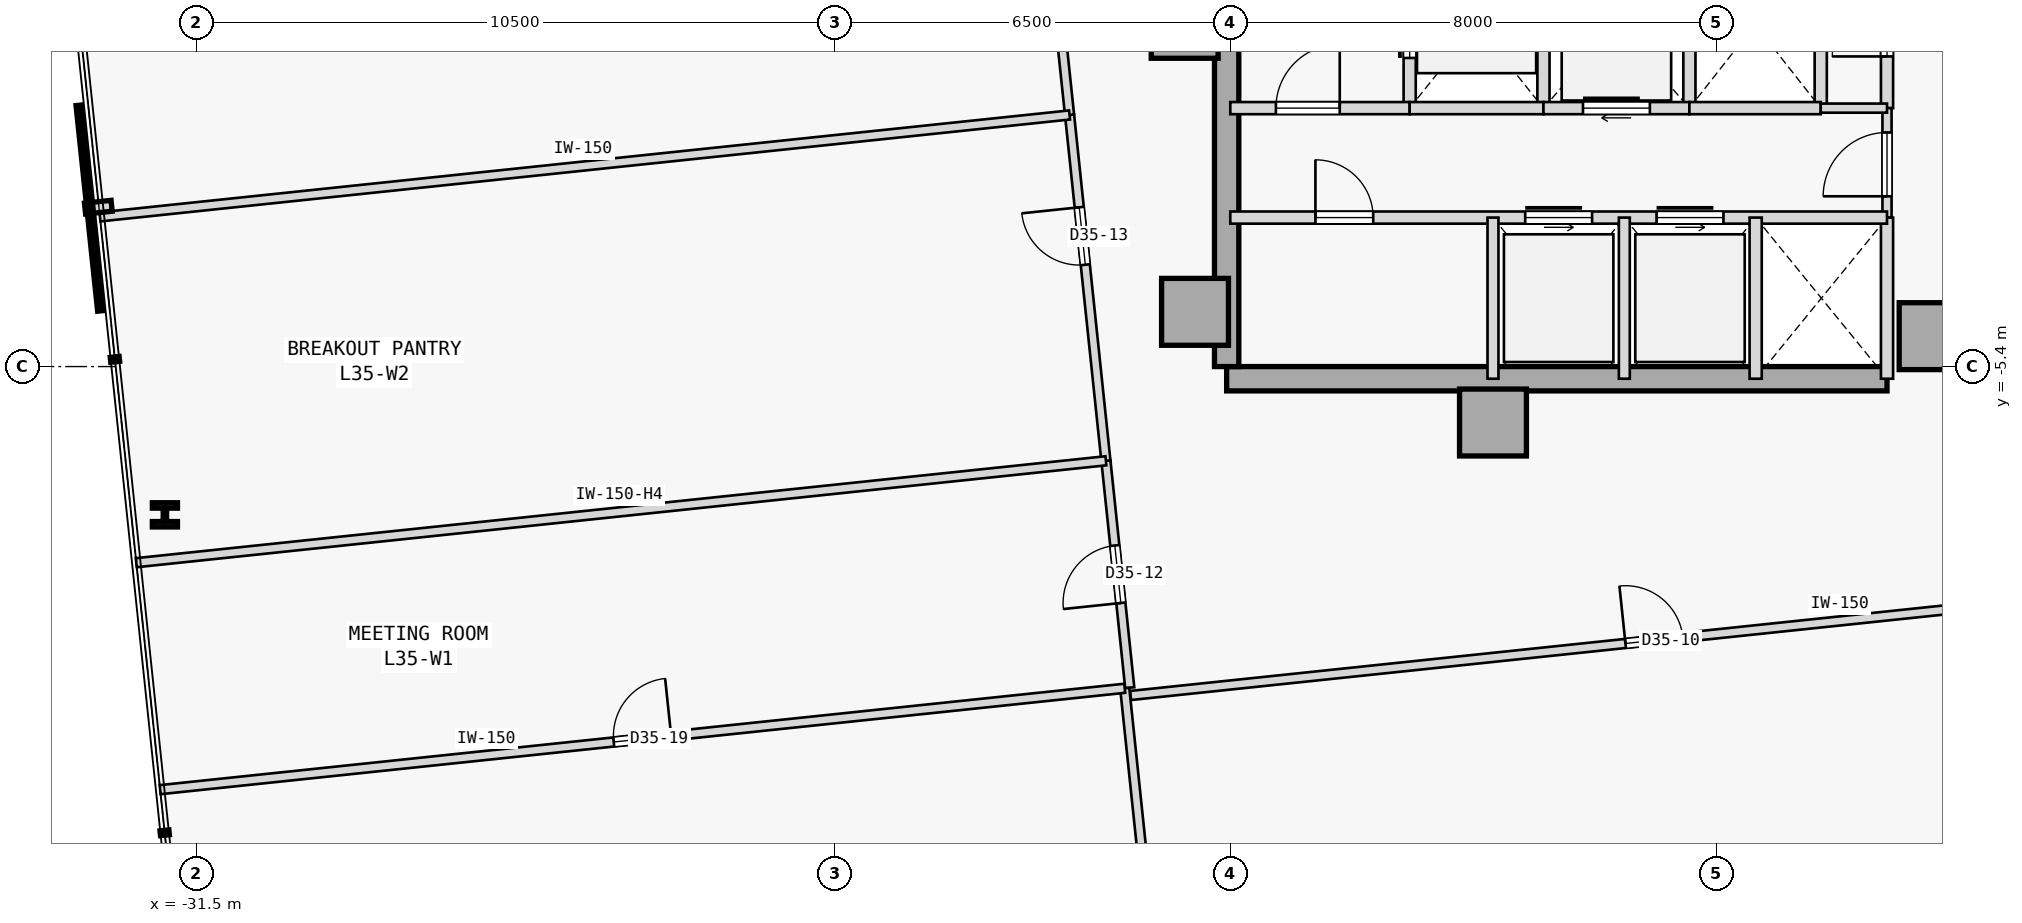
"""IFC4 building model, lengths in metres.
Left out: names, types, materials, properties, quantities, classifications, styles, units other than length and angle.
Written with IfcOpenShell. Run it as: python <this file> out.ifc"""

import sys

from ifc_helpers import new_model, si_unit, direction, frame, frame_2d, origin, origin_2d, place, context, subcontext, project, spatial, rectangle, i_section, extrude, element, fill, save


model = new_model("IFC4")
c1 = context("Model", 3, precision=1e-05, world=origin(), true_north=direction((0.0, 1.0)))
c2 = subcontext(c1, "Body", "Model", "MODEL_VIEW")
j1 = project(units=[si_unit("LENGTHUNIT", "METRE"), si_unit("PLANEANGLEUNIT", "RADIAN")], contexts=[c1])
p1 = place(None, origin())
s1 = spatial("IfcSite", under=j1, at=p1, CompositionType="ELEMENT")
p2 = place(p1, origin())
s2 = spatial("IfcBuilding", under=s1, at=p2, CompositionType="ELEMENT")
p3 = place(p2, frame((0.0, 0.0, 139.2)))
s3 = spatial("IfcBuildingStorey", under=s2, at=p3, CompositionType="ELEMENT", Elevation=139.2)
for number, where, z_axis, x_axis in (
    (1, (-15.25, 0.22, 0.0), (0.0, 0.0, 1.0), (1.0, 0.0, 0.0)),
    (2, (-15.08, -4.5, 0.0), (0.0, 0.0, 1.0), (1.0, 0.0, 0.0)),
    (3, (-10.18, -6.32, 0.0), (0.0, 0.0, 1.0), (1.0, 0.0, 0.0)),
    (4, (-2.95, -4.9, 0.0), (0.0, 0.0, 1.0), (1.0, 0.0, 0.0)),
):
    element("IfcColumn", number, at=place(p3, frame(where, z_axis=z_axis, x_axis=x_axis)), inside=s3, PredefinedType="COLUMN", context=c2, shape_type="SweptSolid", body=[
        extrude(rectangle(XDim=1.1, YDim=1.1, at=origin_2d()), origin(), (0.0, 0.0, 1.0), 3.7),
    ])
p4 = place(p3, frame((-14.56, -5.6, 0.0), z_axis=(0.0, 0.0, 1.0), x_axis=(1.0, 0.0, 0.0)))
e5 = element("IfcWall", 5, at=p4, inside=s3, PredefinedType="SHEAR", context=c2, shape_type="SweptSolid", body=[
    extrude(rectangle(XDim=10.86, YDim=0.4, at=frame_2d((5.43, 0.0))), origin(), (0.0, 0.0, 1.0), 3.3),
])
p5 = place(p3, frame((-14.56, -5.4, 0.0), z_axis=(0.0, 0.0, 1.0), x_axis=(0.0, 1.0, 0.0)))
e6 = element("IfcWall", 6, at=p5, inside=s3, PredefinedType="SHEAR", context=c2, shape_type="SweptSolid", body=[
    extrude(rectangle(XDim=10.8, YDim=0.4, at=frame_2d((5.4, 0.0))), origin(), (0.0, 0.0, 1.0), 3.3),
])
p6 = place(p3, frame((-32.021, -7.838, 0.0), z_axis=(0.0, 0.0, 1.0), x_axis=(1.0, 0.0, 0.0)))
e7 = element("IfcColumn", 7, at=p6, inside=s3, PredefinedType="COLUMN", context=c2, shape_type="SweptSolid", body=[
    extrude(i_section(OverallWidth=0.413, OverallDepth=0.398, WebThickness=0.056, FlangeThickness=0.089, FilletRadius=0.015, at=origin_2d()), origin(), (0.0, 0.0, 1.0), 3.7),
])
p7 = place(p3, frame((-3.7, -1.15, 0.0), z_axis=(0.0, 0.0, 1.0), x_axis=(0.0, 1.0, 0.0)))
e8 = element("IfcWall", 8, at=p7, inside=s3, PredefinedType="STANDARD", context=c2, shape_type="SweptSolid", body=[
    extrude(rectangle(XDim=6.75, YDim=0.2, at=frame_2d((3.375, 0.0))), origin(), (0.0, 0.0, 1.0), 3.3),
])
p8 = place(p7, frame((3.6, 0.0, 0.0)))
e9 = element("IfcOpeningElement", 9, at=p8, cuts=e8, PredefinedType="OPENING", context=c2, shape_type="SweptSolid", body=[
    extrude(rectangle(XDim=0.92, YDim=2.15, at=frame_2d((0.46, 1.075))), frame((0.0, 0.11, 0.0), z_axis=(0.0, -1.0, 0.0), x_axis=(1.0, 0.0, 0.0)), (0.0, 0.0, 1.0), 0.22),
])
p9 = place(p7, frame((0.85, 0.0, 0.0)))
e10 = element("IfcOpeningElement", 10, at=p9, cuts=e8, PredefinedType="OPENING", context=c2, shape_type="SweptSolid", body=[
    extrude(rectangle(XDim=0.9, YDim=2.15, at=frame_2d((0.45, 1.075))), frame((0.0, 0.11, 0.0), z_axis=(0.0, -1.0, 0.0), x_axis=(1.0, 0.0, 0.0)), (0.0, 0.0, 1.0), 0.22),
])
p10 = place(p3, frame((-3.7, -2.95, 0.0), z_axis=(0.0, 0.0, 1.0), x_axis=(0.0, 1.0, 0.0)))
e11 = element("IfcWall", 11, at=p10, inside=s3, PredefinedType="PARTITIONING", context=c2, shape_type="SweptSolid", body=[
    extrude(rectangle(XDim=1.8, YDim=0.15, at=frame_2d((0.9, 0.0))), origin(), (0.0, 0.0, 1.0), 3.3),
])
p11 = place(p10, frame((0.35, 0.0, 0.0)))
e12 = element("IfcOpeningElement", 12, at=p11, cuts=e11, PredefinedType="OPENING", context=c2, shape_type="SweptSolid", body=[
    extrude(rectangle(XDim=1.05, YDim=2.18, at=frame_2d((0.525, 1.09))), frame((0.0, 0.085, 0.0), z_axis=(0.0, -1.0, 0.0), x_axis=(1.0, 0.0, 0.0)), (0.0, 0.0, 1.0), 0.17),
])
p12 = place(p3, frame((-3.7, -5.6, 0.0), z_axis=(0.0, 0.0, 1.0), x_axis=(0.0, 1.0, 0.0)))
e13 = element("IfcWall", 13, at=p12, inside=s3, PredefinedType="STANDARD", context=c2, shape_type="SweptSolid", body=[
    extrude(rectangle(XDim=2.65, YDim=0.2, at=frame_2d((1.325, 0.0))), origin(), (0.0, 0.0, 1.0), 3.3),
])
p13 = place(p3, frame((-11.55, -1.15, 0.0), z_axis=(0.0, 0.0, 1.0), x_axis=(0.0, 1.0, 0.0)))
e14 = element("IfcWall", 14, at=p13, inside=s3, PredefinedType="STANDARD", context=c2, shape_type="SweptSolid", body=[
    extrude(rectangle(XDim=2.75, YDim=0.2, at=frame_2d((1.375, 0.0))), origin(), (0.0, 0.0, 1.0), 3.3),
])
p14 = place(p13, frame((0.825, 0.0, 0.0)))
e15 = element("IfcOpeningElement", 15, at=p14, cuts=e14, PredefinedType="OPENING", context=c2, shape_type="SweptSolid", body=[
    extrude(rectangle(XDim=1.1, YDim=2.15, at=frame_2d((0.55, 1.075))), frame((0.0, 0.11, 0.0), z_axis=(0.0, -1.0, 0.0), x_axis=(1.0, 0.0, 0.0)), (0.0, 0.0, 1.0), 0.22),
])
p15 = place(p3, frame((-9.35, -1.15, 0.0), z_axis=(0.0, 0.0, 1.0), x_axis=(0.0, 1.0, 0.0)))
e16 = element("IfcWall", 16, at=p15, inside=s3, PredefinedType="STANDARD", context=c2, shape_type="SweptSolid", body=[
    extrude(rectangle(XDim=2.75, YDim=0.2, at=frame_2d((1.375, 0.0))), origin(), (0.0, 0.0, 1.0), 3.3),
])
p16 = place(p3, frame((-14.5, -1.15, 0.0), z_axis=(0.0, 0.0, 1.0), x_axis=(1.0, 0.0, 0.0)))
e17 = element("IfcWall", 17, at=p16, inside=s3, PredefinedType="STANDARD", context=c2, shape_type="SweptSolid", body=[
    extrude(rectangle(XDim=2.95, YDim=0.2, at=frame_2d((1.475, 0.0))), origin(), (0.0, 0.0, 1.0), 3.3),
])
p17 = place(p16, frame((0.75, 0.0, 0.0)))
e18 = element("IfcOpeningElement", 18, at=p17, cuts=e17, PredefinedType="OPENING", context=c2, shape_type="SweptSolid", body=[
    extrude(rectangle(XDim=1.05, YDim=2.18, at=frame_2d((0.525, 1.09))), frame((0.0, 0.11, 0.0), z_axis=(0.0, -1.0, 0.0), x_axis=(1.0, 0.0, 0.0)), (0.0, 0.0, 1.0), 0.22),
])
p18 = place(p3, frame((-11.55, -1.15, 0.0), z_axis=(0.0, 0.0, 1.0), x_axis=(1.0, 0.0, 0.0)))
e19 = element("IfcWall", 19, at=p18, inside=s3, PredefinedType="STANDARD", context=c2, shape_type="SweptSolid", body=[
    extrude(rectangle(XDim=2.2, YDim=0.2, at=frame_2d((1.1, 0.0))), origin(), (0.0, 0.0, 1.0), 3.3),
])
p19 = place(p3, frame((-6.95, -1.15, 0.0), z_axis=(0.0, 0.0, 1.0), x_axis=(0.0, 1.0, 0.0)))
e20 = element("IfcWall", 20, at=p19, inside=s3, PredefinedType="STANDARD", context=c2, shape_type="SweptSolid", body=[
    extrude(rectangle(XDim=2.75, YDim=0.2, at=frame_2d((1.375, 0.0))), origin(), (0.0, 0.0, 1.0), 3.3),
])
p20 = place(p3, frame((-9.35, -1.15, 0.0), z_axis=(0.0, 0.0, 1.0), x_axis=(1.0, 0.0, 0.0)))
e21 = element("IfcWall", 21, at=p20, inside=s3, PredefinedType="STANDARD", context=c2, shape_type="SweptSolid", body=[
    extrude(rectangle(XDim=2.4, YDim=0.2, at=frame_2d((1.2, 0.0))), origin(), (0.0, 0.0, 1.0), 3.3),
])
p21 = place(p20, frame((0.65, 0.0, 0.0)))
e22 = element("IfcOpeningElement", 22, at=p21, cuts=e21, PredefinedType="OPENING", context=c2, shape_type="SweptSolid", body=[
    extrude(rectangle(XDim=1.1, YDim=2.15, at=frame_2d((0.55, 1.075))), frame((0.0, 0.11, 0.0), z_axis=(0.0, -1.0, 0.0), x_axis=(1.0, 0.0, 0.0)), (0.0, 0.0, 1.0), 0.22),
])
p22 = place(p3, frame((-4.79, -1.15, 0.0), z_axis=(0.0, 0.0, 1.0), x_axis=(0.0, 1.0, 0.0)))
e23 = element("IfcWall", 23, at=p22, inside=s3, PredefinedType="STANDARD", context=c2, shape_type="SweptSolid", body=[
    extrude(rectangle(XDim=2.75, YDim=0.2, at=frame_2d((1.375, 0.0))), origin(), (0.0, 0.0, 1.0), 3.3),
])
p23 = place(p3, frame((-6.95, -1.15, 0.0), z_axis=(0.0, 0.0, 1.0), x_axis=(1.0, 0.0, 0.0)))
e24 = element("IfcWall", 24, at=p23, inside=s3, PredefinedType="STANDARD", context=c2, shape_type="SweptSolid", body=[
    extrude(rectangle(XDim=2.16, YDim=0.2, at=frame_2d((1.08, 0.0))), origin(), (0.0, 0.0, 1.0), 3.3),
])
p24 = place(p3, frame((-4.79, -1.15, 0.0), z_axis=(0.0, 0.0, 1.0), x_axis=(1.0, 0.0, 0.0)))
e25 = element("IfcWall", 25, at=p24, inside=s3, PredefinedType="PARTITIONING", context=c2, shape_type="SweptSolid", body=[
    extrude(rectangle(XDim=1.09, YDim=0.15, at=frame_2d((0.545, 0.0))), origin(), (0.0, 0.0, 1.0), 3.3),
])
p25 = place(p3, frame((-14.5, -2.95, 0.0), z_axis=(0.0, 0.0, 1.0), x_axis=(1.0, 0.0, 0.0)))
e26 = element("IfcWall", 26, at=p25, inside=s3, PredefinedType="STANDARD", context=c2, shape_type="SweptSolid", body=[
    extrude(rectangle(XDim=10.8, YDim=0.2, at=frame_2d((5.4, 0.0))), origin(), (0.0, 0.0, 1.0), 3.3),
])
p26 = place(p25, frame((4.85, 0.0, 0.0)))
e27 = element("IfcOpeningElement", 27, at=p26, cuts=e26, PredefinedType="OPENING", context=c2, shape_type="SweptSolid", body=[
    extrude(rectangle(XDim=1.1, YDim=2.15, at=frame_2d((0.55, 1.075))), frame((0.0, 0.11, 0.0), z_axis=(0.0, -1.0, 0.0), x_axis=(1.0, 0.0, 0.0)), (0.0, 0.0, 1.0), 0.22),
])
p27 = place(p25, frame((7.01, 0.0, 0.0)))
e28 = element("IfcOpeningElement", 28, at=p27, cuts=e26, PredefinedType="OPENING", context=c2, shape_type="SweptSolid", body=[
    extrude(rectangle(XDim=1.1, YDim=2.15, at=frame_2d((0.55, 1.075))), frame((0.0, 0.11, 0.0), z_axis=(0.0, -1.0, 0.0), x_axis=(1.0, 0.0, 0.0)), (0.0, 0.0, 1.0), 0.22),
])
p28 = place(p25, frame((1.4, 0.0, 0.0)))
e29 = element("IfcOpeningElement", 29, at=p28, cuts=e26, PredefinedType="OPENING", context=c2, shape_type="SweptSolid", body=[
    extrude(rectangle(XDim=0.95, YDim=2.15, at=frame_2d((0.475, 1.075))), frame((0.0, 0.11, 0.0), z_axis=(0.0, -1.0, 0.0), x_axis=(1.0, 0.0, 0.0)), (0.0, 0.0, 1.0), 0.22),
])
p29 = place(p3, frame((-5.86, -5.6, 0.0), z_axis=(0.0, 0.0, 1.0), x_axis=(0.0, 1.0, 0.0)))
e30 = element("IfcWall", 30, at=p29, inside=s3, PredefinedType="STANDARD", context=c2, shape_type="SweptSolid", body=[
    extrude(rectangle(XDim=2.65, YDim=0.2, at=frame_2d((1.325, 0.0))), origin(), (0.0, 0.0, 1.0), 3.3),
])
for number, where, z_axis, x_axis in (
    (31, (-10.18, -5.6, 0.0), (0.0, 0.0, 1.0), (0.0, 1.0, 0.0)),
    (32, (-8.02, -5.6, 0.0), (0.0, 0.0, 1.0), (0.0, 1.0, 0.0)),
):
    element("IfcWall", number, at=place(p3, frame(where, z_axis=z_axis, x_axis=x_axis)), inside=s3, PredefinedType="STANDARD", context=c2, shape_type="SweptSolid", body=[
        extrude(rectangle(XDim=2.65, YDim=0.18, at=frame_2d((1.325, 0.0))), origin(), (0.0, 0.0, 1.0), 3.3),
    ])
p30 = place(p3, frame((-16.14, -10.809, 0.0), z_axis=(0.0, 0.0, 1.0), x_axis=(0.994522126729, 0.104526261998, 0.0)))
e33 = element("IfcWall", 33, at=p30, inside=s3, PredefinedType="PARTITIONING", context=c2, shape_type="SweptSolid", body=[
    extrude(rectangle(XDim=17.317, YDim=0.15, at=frame_2d((8.658, 0.0))), origin(), (0.0, 0.0, 1.0), 3.3),
])
p31 = place(p30, frame((8.184, 0.0, 0.0)))
e34 = element("IfcOpeningElement", 34, at=p31, cuts=e33, PredefinedType="OPENING", context=c2, shape_type="SweptSolid", body=[
    extrude(rectangle(XDim=0.95, YDim=2.15, at=frame_2d((0.475, 1.075))), frame((0.0, 0.085, 0.0), z_axis=(0.0, -1.0, 0.0), x_axis=(1.0, 0.0, 0.0)), (0.0, 0.0, 1.0), 0.17),
])
p32 = place(p3, frame((-16.153, -10.682, 0.0), z_axis=(0.0, 0.0, 1.0), x_axis=(-0.104539173002, 0.994520769671, 0.0)))
e35 = element("IfcWall", 35, at=p32, inside=s3, PredefinedType="PARTITIONING", context=c2, shape_type="SweptSolid", body=[
    extrude(rectangle(XDim=3.753, YDim=0.15, at=frame_2d((1.876, 0.0))), origin(), (0.0, 0.0, 1.0), 3.3),
])
p33 = place(p32, frame((1.402, 0.0, 0.0)))
e36 = element("IfcOpeningElement", 36, at=p33, cuts=e35, PredefinedType="OPENING", context=c2, shape_type="SweptSolid", body=[
    extrude(rectangle(XDim=0.95, YDim=2.15, at=frame_2d((0.475, 1.075))), frame((0.0, 0.085, 0.0), z_axis=(0.0, -1.0, 0.0), x_axis=(1.0, 0.0, 0.0)), (0.0, 0.0, 1.0), 0.17),
])
p34 = place(p3, frame((-16.546, -6.949, 0.0), z_axis=(0.0, 0.0, 1.0), x_axis=(-0.104520314957, 0.994522751756, 0.0)))
e37 = element("IfcWall", 37, at=p34, inside=s3, PredefinedType="PARTITIONING", context=c2, shape_type="SweptSolid", body=[
    extrude(rectangle(XDim=5.718, YDim=0.15, at=frame_2d((2.859, 0.0))), origin(), (0.0, 0.0, 1.0), 3.3),
])
p35 = place(p34, frame((3.242, 0.0, 0.0)))
e38 = element("IfcOpeningElement", 38, at=p35, cuts=e37, PredefinedType="OPENING", context=c2, shape_type="SweptSolid", body=[
    extrude(rectangle(XDim=0.95, YDim=2.15, at=frame_2d((0.475, 1.075))), frame((0.0, 0.085, 0.0), z_axis=(0.0, -1.0, 0.0), x_axis=(1.0, 0.0, 0.0)), (0.0, 0.0, 1.0), 0.17),
])
p36 = place(p3, frame((-17.143, -1.263, 0.0), z_axis=(0.0, 0.0, 1.0), x_axis=(-0.104527419485, 0.994522005074, 0.0)))
e39 = element("IfcWall", 39, at=p36, inside=s3, PredefinedType="PARTITIONING", context=c2, shape_type="SweptSolid", body=[
    extrude(rectangle(XDim=8.399, YDim=0.15, at=frame_2d((4.199, 0.0))), origin(), (0.0, 0.0, 1.0), 3.3),
])
p37 = place(p36, frame((3.725, 0.0, 0.0)))
e40 = element("IfcOpeningElement", 40, at=p37, cuts=e39, PredefinedType="OPENING", context=c2, shape_type="SweptSolid", body=[
    extrude(rectangle(XDim=0.95, YDim=2.15, at=frame_2d((0.475, 1.075))), frame((0.0, 0.085, 0.0), z_axis=(0.0, -1.0, 0.0), x_axis=(1.0, 0.0, 0.0)), (0.0, 0.0, 1.0), 0.17),
])
p38 = place(p3, frame((-14.958, -22.844, 0.0), z_axis=(0.0, 0.0, 1.0), x_axis=(-0.104540236679, 0.994520657862, 0.0)))
e41 = element("IfcWall", 41, at=p38, inside=s3, PredefinedType="PARTITIONING", context=c2, shape_type="SweptSolid", body=[
    extrude(rectangle(XDim=12.221, YDim=0.15, at=frame_2d((6.11, 0.0))), origin(), (0.0, 0.0, 1.0), 3.3),
])
p39 = place(p3, frame((-32.099, -12.358, 0.0), z_axis=(0.0, 0.0, 1.0), x_axis=(0.994521795881, 0.104529409818, 0.0)))
e42 = element("IfcWall", 42, at=p39, inside=s3, PredefinedType="PARTITIONING", context=c2, shape_type="SweptSolid", body=[
    extrude(rectangle(XDim=15.95, YDim=0.15, at=frame_2d((7.975, 0.0))), origin(), (0.0, 0.0, 1.0), 3.3),
])
p40 = place(p39, frame((7.5, 0.0, 0.0)))
e43 = element("IfcOpeningElement", 43, at=p40, cuts=e42, PredefinedType="OPENING", context=c2, shape_type="SweptSolid", body=[
    extrude(rectangle(XDim=0.95, YDim=2.15, at=frame_2d((0.475, 1.075))), frame((0.0, 0.085, 0.0), z_axis=(0.0, -1.0, 0.0), x_axis=(1.0, 0.0, 0.0)), (0.0, 0.0, 1.0), 0.17),
])
p41 = place(p3, frame((-32.491, -8.625, 0.0), z_axis=(0.0, 0.0, 1.0), x_axis=(0.994522794159, 0.104519911488, 0.0)))
e44 = element("IfcWall", 44, at=p41, inside=s3, PredefinedType="PARTITIONING", context=c2, shape_type="SweptSolid", body=[
    extrude(rectangle(XDim=16.033, YDim=0.15, at=frame_2d((8.017, 0.0))), origin(), (0.0, 0.0, 1.0), 2.24),
])
p42 = place(p3, frame((-33.089, -2.939, 0.0), z_axis=(0.0, 0.0, 1.0), x_axis=(0.994521211213, 0.104534972363, 0.0)))
e45 = element("IfcWall", 45, at=p42, inside=s3, PredefinedType="PARTITIONING", context=c2, shape_type="SweptSolid", body=[
    extrude(rectangle(XDim=16.033, YDim=0.15, at=frame_2d((8.017, 0.0))), origin(), (0.0, 0.0, 1.0), 3.3),
])
p43 = place(p17, origin())
e46 = element("IfcDoor", 46, at=p43, inside=s3, OperationType="SINGLE_SWING_RIGHT", PredefinedType="DOOR", context=c2, shape_type="SweptSolid", body=[
    extrude(rectangle(XDim=1.05, YDim=2.18, at=frame_2d((0.525, 1.09))), frame((0.0, 0.025, 0.0), z_axis=(0.0, -1.0, 0.0), x_axis=(1.0, 0.0, 0.0)), (0.0, 0.0, 1.0), 0.05),
])
fill(e18, e46)
p44 = place(p11, origin())
e47 = element("IfcDoor", 47, at=p44, inside=s3, OperationType="SINGLE_SWING_LEFT", PredefinedType="DOOR", context=c2, shape_type="SweptSolid", body=[
    extrude(rectangle(XDim=1.05, YDim=2.18, at=frame_2d((0.525, 1.09))), frame((0.0, 0.025, 0.0), z_axis=(0.0, -1.0, 0.0), x_axis=(1.0, 0.0, 0.0)), (0.0, 0.0, 1.0), 0.05),
])
fill(e12, e47)
p45 = place(p14, origin())
e48 = element("IfcDoor", 48, at=p45, inside=s3, OperationType="SLIDING_TO_RIGHT", PredefinedType="DOOR", context=c2, shape_type="SweptSolid", body=[
    extrude(rectangle(XDim=1.1, YDim=2.15, at=frame_2d((0.55, 1.075))), frame((0.0, 0.025, 0.0), z_axis=(0.0, -1.0, 0.0), x_axis=(1.0, 0.0, 0.0)), (0.0, 0.0, 1.0), 0.05),
])
fill(e15, e48)
p46 = place(p21, origin())
e49 = element("IfcDoor", 49, at=p46, inside=s3, OperationType="SLIDING_TO_RIGHT", PredefinedType="DOOR", context=c2, shape_type="SweptSolid", body=[
    extrude(rectangle(XDim=1.1, YDim=2.15, at=frame_2d((0.55, 1.075))), frame((0.0, 0.025, 0.0), z_axis=(0.0, -1.0, 0.0), x_axis=(1.0, 0.0, 0.0)), (0.0, 0.0, 1.0), 0.05),
])
fill(e22, e49)
p47 = place(p26, origin())
e50 = element("IfcDoor", 50, at=p47, inside=s3, OperationType="SLIDING_TO_LEFT", PredefinedType="DOOR", context=c2, shape_type="SweptSolid", body=[
    extrude(rectangle(XDim=1.1, YDim=2.15, at=frame_2d((0.55, 1.075))), frame((0.0, 0.025, 0.0), z_axis=(0.0, -1.0, 0.0), x_axis=(1.0, 0.0, 0.0)), (0.0, 0.0, 1.0), 0.05),
])
fill(e27, e50)
p48 = place(p27, origin())
e51 = element("IfcDoor", 51, at=p48, inside=s3, OperationType="SLIDING_TO_LEFT", PredefinedType="DOOR", context=c2, shape_type="SweptSolid", body=[
    extrude(rectangle(XDim=1.1, YDim=2.15, at=frame_2d((0.55, 1.075))), frame((0.0, 0.025, 0.0), z_axis=(0.0, -1.0, 0.0), x_axis=(1.0, 0.0, 0.0)), (0.0, 0.0, 1.0), 0.05),
])
fill(e28, e51)
p49 = place(p28, origin())
e52 = element("IfcDoor", 52, at=p49, inside=s3, OperationType="SINGLE_SWING_LEFT", PredefinedType="DOOR", context=c2, shape_type="SweptSolid", body=[
    extrude(rectangle(XDim=0.95, YDim=2.15, at=frame_2d((0.475, 1.075))), frame((0.0, 0.025, 0.0), z_axis=(0.0, -1.0, 0.0), x_axis=(1.0, 0.0, 0.0)), (0.0, 0.0, 1.0), 0.05),
])
fill(e29, e52)
p50 = place(p9, origin())
e53 = element("IfcDoor", 53, at=p50, inside=s3, OperationType="SINGLE_SWING_LEFT", PredefinedType="DOOR", context=c2, shape_type="SweptSolid", body=[
    extrude(rectangle(XDim=0.9, YDim=2.15, at=frame_2d((0.45, 1.075))), frame((0.0, 0.025, 0.0), z_axis=(0.0, -1.0, 0.0), x_axis=(1.0, 0.0, 0.0)), (0.0, 0.0, 1.0), 0.05),
])
fill(e10, e53)
p51 = place(p31, origin())
e54 = element("IfcDoor", 54, at=p51, inside=s3, OperationType="SINGLE_SWING_LEFT", PredefinedType="DOOR", context=c2, shape_type="SweptSolid", body=[
    extrude(rectangle(XDim=0.95, YDim=2.15, at=frame_2d((0.475, 1.075))), frame((0.0, 0.025, 0.0), z_axis=(0.0, -1.0, 0.0), x_axis=(1.0, 0.0, 0.0)), (0.0, 0.0, 1.0), 0.05),
])
fill(e34, e54)
p52 = place(p33, origin())
e55 = element("IfcDoor", 55, at=p52, inside=s3, OperationType="SINGLE_SWING_LEFT", PredefinedType="DOOR", context=c2, shape_type="SweptSolid", body=[
    extrude(rectangle(XDim=0.95, YDim=2.15, at=frame_2d((0.475, 1.075))), frame((0.0, 0.025, 0.0), z_axis=(0.0, -1.0, 0.0), x_axis=(1.0, 0.0, 0.0)), (0.0, 0.0, 1.0), 0.05),
])
fill(e36, e55)
p53 = place(p35, origin())
e56 = element("IfcDoor", 56, at=p53, inside=s3, OperationType="SINGLE_SWING_RIGHT", PredefinedType="DOOR", context=c2, shape_type="SweptSolid", body=[
    extrude(rectangle(XDim=0.95, YDim=2.15, at=frame_2d((0.475, 1.075))), frame((0.0, 0.025, 0.0), z_axis=(0.0, -1.0, 0.0), x_axis=(1.0, 0.0, 0.0)), (0.0, 0.0, 1.0), 0.05),
])
fill(e38, e56)
p54 = place(p40, origin())
e57 = element("IfcDoor", 57, at=p54, inside=s3, OperationType="SINGLE_SWING_RIGHT", PredefinedType="DOOR", context=c2, shape_type="SweptSolid", body=[
    extrude(rectangle(XDim=0.95, YDim=2.15, at=frame_2d((0.475, 1.075))), frame((0.0, 0.025, 0.0), z_axis=(0.0, -1.0, 0.0), x_axis=(1.0, 0.0, 0.0)), (0.0, 0.0, 1.0), 0.05),
])
fill(e43, e57)
save(model, sys.argv[1])
